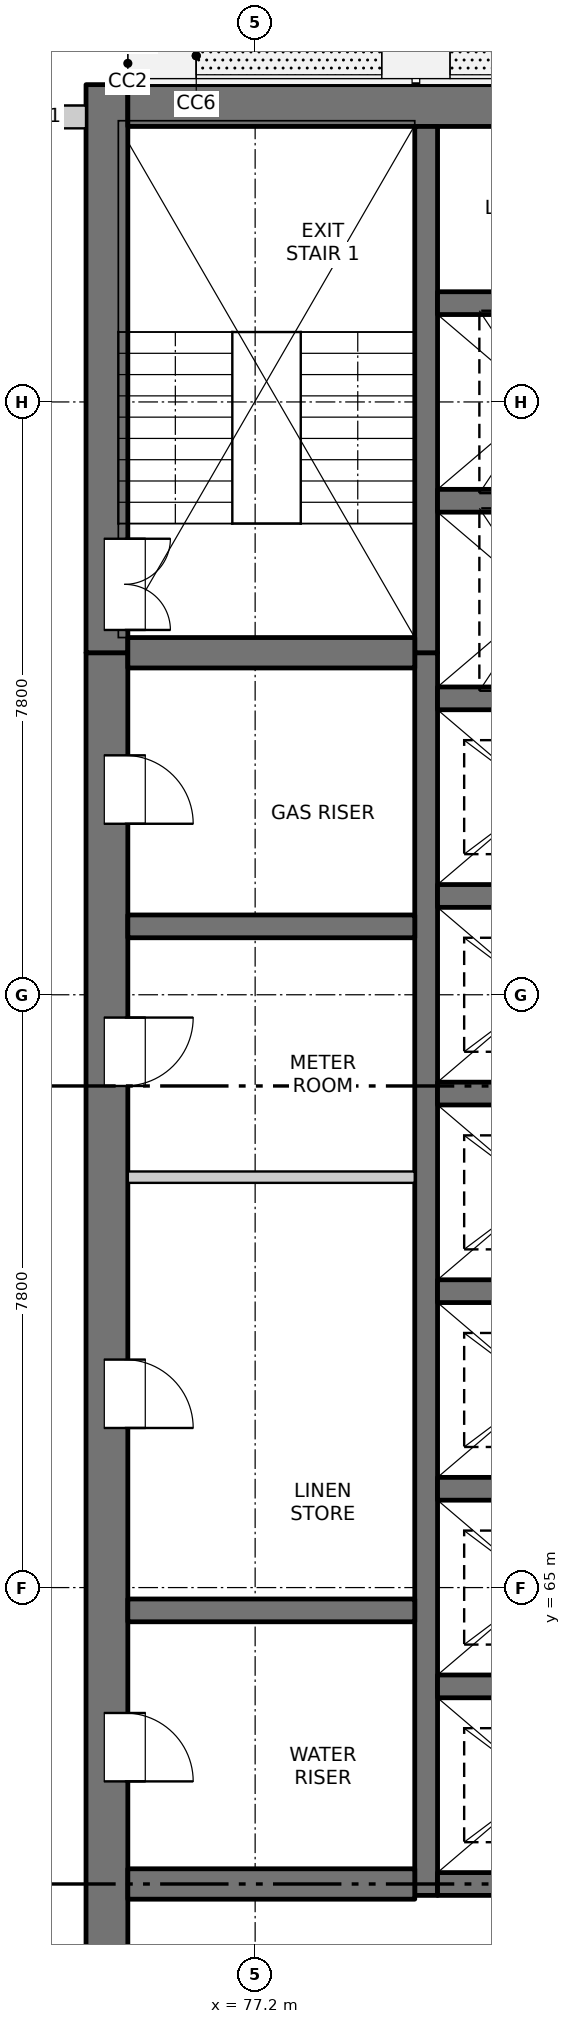
"""IFC4 building model, lengths in metres.
Left out: names, types, materials, properties, quantities, classifications, styles, units other than length and angle.
Written with IfcOpenShell. Run it as: python <this file> out.ifc"""

import sys

from ifc_helpers import new_model, si_unit, direction, frame, frame_2d, origin, place, context, subcontext, project, spatial, rectangle, extrude, element, fill, save


model = new_model("IFC4")
c1 = context("Model", 3, precision=1e-05, world=origin(), true_north=direction((0.0, 1.0)))
c2 = subcontext(c1, "Body", "Model", "MODEL_VIEW")
j1 = project(units=[si_unit("LENGTHUNIT", "METRE"), si_unit("PLANEANGLEUNIT", "RADIAN")], contexts=[c1])
p1 = place(None, origin())
s1 = spatial("IfcSite", under=j1, at=p1, CompositionType="ELEMENT")
p2 = place(p1, origin())
s2 = spatial("IfcBuilding", under=s1, at=p2, CompositionType="ELEMENT")
p3 = place(p2, frame((0.0, 0.0, 130.5)))
s3 = spatial("IfcBuildingStorey", under=s2, at=p3, CompositionType="ELEMENT", Elevation=130.5)
p4 = place(p3, frame((75.25, 54.975, -0.25), z_axis=(0.0, 0.0, 1.0), x_axis=(0.0, 1.0, 0.0)))
e1 = element("IfcWall", 1, at=p4, inside=s3, PredefinedType="SOLIDWALL", context=c2, shape_type="SweptSolid", body=[
    extrude(rectangle(XDim=22.325, YDim=0.55, at=frame_2d((11.163, 0.0))), origin(), (0.0, 0.0, 1.0), 3.4),
])
p5 = place(p4, frame((7.475, 0.0, 0.25)))
e2 = element("IfcOpeningElement", 2, at=p5, cuts=e1, PredefinedType="OPENING", context=c2, shape_type="SweptSolid", body=[
    extrude(rectangle(XDim=0.9, YDim=2.1, at=frame_2d((0.45, 1.05))), frame((0.0, 0.285, 0.0), z_axis=(0.0, -1.0, 0.0), x_axis=(1.0, 0.0, 0.0)), (0.0, 0.0, 1.0), 0.57),
])
p6 = place(p4, frame((12.125, 0.0, 0.25)))
e3 = element("IfcOpeningElement", 3, at=p6, cuts=e1, PredefinedType="OPENING", context=c2, shape_type="SweptSolid", body=[
    extrude(rectangle(XDim=0.9, YDim=2.1, at=frame_2d((0.45, 1.05))), frame((0.0, 0.285, 0.0), z_axis=(0.0, -1.0, 0.0), x_axis=(1.0, 0.0, 0.0)), (0.0, 0.0, 1.0), 0.57),
])
p7 = place(p4, frame((16.625, 0.0, 0.25)))
e4 = element("IfcOpeningElement", 4, at=p7, cuts=e1, PredefinedType="OPENING", context=c2, shape_type="SweptSolid", body=[
    extrude(rectangle(XDim=0.9, YDim=2.1, at=frame_2d((0.45, 1.05))), frame((0.0, 0.285, 0.0), z_axis=(0.0, -1.0, 0.0), x_axis=(1.0, 0.0, 0.0)), (0.0, 0.0, 1.0), 0.57),
])
p8 = place(p4, frame((20.075, 0.0, 0.25)))
e5 = element("IfcOpeningElement", 5, at=p8, cuts=e1, PredefinedType="OPENING", context=c2, shape_type="SweptSolid", body=[
    extrude(rectangle(XDim=0.9, YDim=2.1, at=frame_2d((0.45, 1.05))), frame((0.0, 0.285, 0.0), z_axis=(0.0, -1.0, 0.0), x_axis=(1.0, 0.0, 0.0)), (0.0, 0.0, 1.0), 0.57),
])
p9 = place(p3, frame((75.25, 77.3, -0.25), z_axis=(0.0, 0.0, 1.0), x_axis=(0.0, 1.0, 0.0)))
e6 = element("IfcWall", 6, at=p9, inside=s3, PredefinedType="SOLIDWALL", context=c2, shape_type="SweptSolid", body=[
    extrude(rectangle(XDim=7.475, YDim=0.55, at=frame_2d((3.737, 0.0))), origin(), (0.0, 0.0, 1.0), 3.4),
])
p10 = place(p9, frame((0.3, 0.0, 0.25)))
e7 = element("IfcOpeningElement", 7, at=p10, cuts=e6, PredefinedType="OPENING", context=c2, shape_type="SweptSolid", body=[
    extrude(rectangle(XDim=1.2, YDim=2.1, at=frame_2d((0.6, 1.05))), frame((0.0, 0.285, 0.0), z_axis=(0.0, -1.0, 0.0), x_axis=(1.0, 0.0, 0.0)), (0.0, 0.0, 1.0), 0.57),
])
p11 = place(p3, frame((75.525, 84.5, -0.25), z_axis=(0.0, 0.0, 1.0), x_axis=(1.0, 0.0, 0.0)))
e8 = element("IfcWall", 8, at=p11, inside=s3, PredefinedType="SOLIDWALL", context=c2, shape_type="SweptSolid", body=[
    extrude(rectangle(XDim=18.95, YDim=0.55, at=frame_2d((9.475, 0.0))), origin(), (0.0, 0.0, 1.0), 3.4),
])
p12 = place(p3, frame((79.45, 60.95, -0.25), z_axis=(0.0, 0.0, 1.0), x_axis=(0.0, 1.0, 0.0)))
e9 = element("IfcWall", 9, at=p12, inside=s3, PredefinedType="SOLIDWALL", context=c2, shape_type="SweptSolid", body=[
    extrude(rectangle(XDim=16.35, YDim=0.3, at=frame_2d((8.175, 0.0))), origin(), (0.0, 0.0, 1.0), 3.4),
])
p13 = place(p3, frame((79.45, 77.3, -0.25), z_axis=(0.0, 0.0, 1.0), x_axis=(0.0, 1.0, 0.0)))
e10 = element("IfcWall", 10, at=p13, inside=s3, PredefinedType="SOLIDWALL", context=c2, shape_type="SweptSolid", body=[
    extrude(rectangle(XDim=6.925, YDim=0.3, at=frame_2d((3.462, 0.0))), origin(), (0.0, 0.0, 1.0), 3.4),
])
for number, where, z_axis, x_axis in (
    (11, (79.6, 61.1, -0.25), (0.0, 0.0, 1.0), (1.0, 0.0, 0.0)),
    (12, (79.6, 63.7, -0.25), (0.0, 0.0, 1.0), (1.0, 0.0, 0.0)),
    (13, (79.6, 66.3, -0.25), (0.0, 0.0, 1.0), (1.0, 0.0, 0.0)),
    (14, (79.6, 68.9, -0.25), (0.0, 0.0, 1.0), (1.0, 0.0, 0.0)),
    (15, (79.6, 71.5, -0.25), (0.0, 0.0, 1.0), (1.0, 0.0, 0.0)),
    (16, (79.6, 74.1, -0.25), (0.0, 0.0, 1.0), (1.0, 0.0, 0.0)),
    (17, (79.6, 76.7, -0.25), (0.0, 0.0, 1.0), (1.0, 0.0, 0.0)),
    (18, (79.6, 79.3, -0.25), (0.0, 0.0, 1.0), (1.0, 0.0, 0.0)),
    (19, (79.6, 81.9, -0.25), (0.0, 0.0, 1.0), (1.0, 0.0, 0.0)),
):
    element("IfcWall", number, at=place(p3, frame(where, z_axis=z_axis, x_axis=x_axis)), inside=s3, PredefinedType="SOLIDWALL", context=c2, shape_type="SweptSolid", body=[
        extrude(rectangle(XDim=3.0, YDim=0.3, at=frame_2d((1.5, 0.0))), origin(), (0.0, 0.0, 1.0), 3.4),
    ])
p14 = place(p3, frame((75.525, 61.1, -0.25), z_axis=(0.0, 0.0, 1.0), x_axis=(1.0, 0.0, 0.0)))
e20 = element("IfcWall", 20, at=p14, inside=s3, PredefinedType="SOLIDWALL", context=c2, shape_type="SweptSolid", body=[
    extrude(rectangle(XDim=3.775, YDim=0.4, at=frame_2d((1.888, 0.0))), origin(), (0.0, 0.0, 1.0), 3.4),
])
for number, where, z_axis, x_axis in (
    (21, (75.525, 64.7, -0.25), (0.0, 0.0, 1.0), (1.0, 0.0, 0.0)),
    (22, (75.525, 73.7, -0.25), (0.0, 0.0, 1.0), (1.0, 0.0, 0.0)),
):
    element("IfcWall", number, at=place(p3, frame(where, z_axis=z_axis, x_axis=x_axis)), inside=s3, PredefinedType="SOLIDWALL", context=c2, shape_type="SweptSolid", body=[
        extrude(rectangle(XDim=3.775, YDim=0.3, at=frame_2d((1.888, 0.0))), origin(), (0.0, 0.0, 1.0), 3.4),
    ])
p15 = place(p3, frame((75.525, 77.3, -0.25), z_axis=(0.0, 0.0, 1.0), x_axis=(1.0, 0.0, 0.0)))
e23 = element("IfcWall", 23, at=p15, inside=s3, PredefinedType="SOLIDWALL", context=c2, shape_type="SweptSolid", body=[
    extrude(rectangle(XDim=3.775, YDim=0.4, at=frame_2d((1.888, 0.0))), origin(), (0.0, 0.0, 1.0), 3.4),
])
p16 = place(p3, frame((73.725, 84.35, 0.0), z_axis=(0.0, 0.0, 1.0), x_axis=(1.0, 0.0, 0.0)))
e24 = element("IfcWall", 24, at=p16, inside=s3, PredefinedType="SOLIDWALL", context=c2, shape_type="SweptSolid", body=[
    extrude(rectangle(XDim=1.25, YDim=0.3, at=frame_2d((0.625, 0.0))), origin(), (0.0, 0.0, 1.0), 2.7),
])
p17 = place(p3, frame((75.525, 70.4, 0.0), z_axis=(0.0, 0.0, 1.0), x_axis=(1.0, 0.0, 0.0)))
e25 = element("IfcWall", 25, at=p17, inside=s3, PredefinedType="PARTITIONING", context=c2, shape_type="SweptSolid", body=[
    extrude(rectangle(XDim=3.775, YDim=0.15, at=frame_2d((1.887, 0.0))), origin(), (0.0, 0.0, 1.0), 3.15),
])
p18 = place(p5, origin())
e26 = element("IfcDoor", 26, at=p18, inside=s3, OperationType="SINGLE_SWING_RIGHT", PredefinedType="DOOR", context=c2, shape_type="SweptSolid", body=[
    extrude(rectangle(XDim=0.9, YDim=2.1, at=frame_2d((0.45, 1.05))), frame((0.0, -0.21, 0.0), z_axis=(0.0, -1.0, 0.0), x_axis=(1.0, 0.0, 0.0)), (0.0, 0.0, 1.0), 0.05),
])
fill(e2, e26)
p19 = place(p6, origin())
e27 = element("IfcDoor", 27, at=p19, inside=s3, OperationType="SINGLE_SWING_RIGHT", PredefinedType="DOOR", context=c2, shape_type="SweptSolid", body=[
    extrude(rectangle(XDim=0.9, YDim=2.1, at=frame_2d((0.45, 1.05))), frame((0.0, -0.21, 0.0), z_axis=(0.0, -1.0, 0.0), x_axis=(1.0, 0.0, 0.0)), (0.0, 0.0, 1.0), 0.05),
])
fill(e3, e27)
p20 = place(p7, origin())
e28 = element("IfcDoor", 28, at=p20, inside=s3, OperationType="SINGLE_SWING_LEFT", PredefinedType="DOOR", context=c2, shape_type="SweptSolid", body=[
    extrude(rectangle(XDim=0.9, YDim=2.1, at=frame_2d((0.45, 1.05))), frame((0.0, -0.21, 0.0), z_axis=(0.0, -1.0, 0.0), x_axis=(1.0, 0.0, 0.0)), (0.0, 0.0, 1.0), 0.05),
])
fill(e4, e28)
p21 = place(p8, origin())
e29 = element("IfcDoor", 29, at=p21, inside=s3, OperationType="SINGLE_SWING_RIGHT", PredefinedType="DOOR", context=c2, shape_type="SweptSolid", body=[
    extrude(rectangle(XDim=0.9, YDim=2.1, at=frame_2d((0.45, 1.05))), frame((0.0, -0.21, 0.0), z_axis=(0.0, -1.0, 0.0), x_axis=(1.0, 0.0, 0.0)), (0.0, 0.0, 1.0), 0.05),
])
fill(e5, e29)
p22 = place(p10, origin())
e30 = element("IfcDoor", 30, at=p22, inside=s3, OperationType="DOUBLE_DOOR_SINGLE_SWING", PredefinedType="DOOR", context=c2, shape_type="SweptSolid", body=[
    extrude(rectangle(XDim=1.2, YDim=2.1, at=frame_2d((0.6, 1.05))), frame((0.0, -0.21, 0.0), z_axis=(0.0, -1.0, 0.0), x_axis=(1.0, 0.0, 0.0)), (0.0, 0.0, 1.0), 0.05),
])
fill(e7, e30)
save(model, sys.argv[1])
